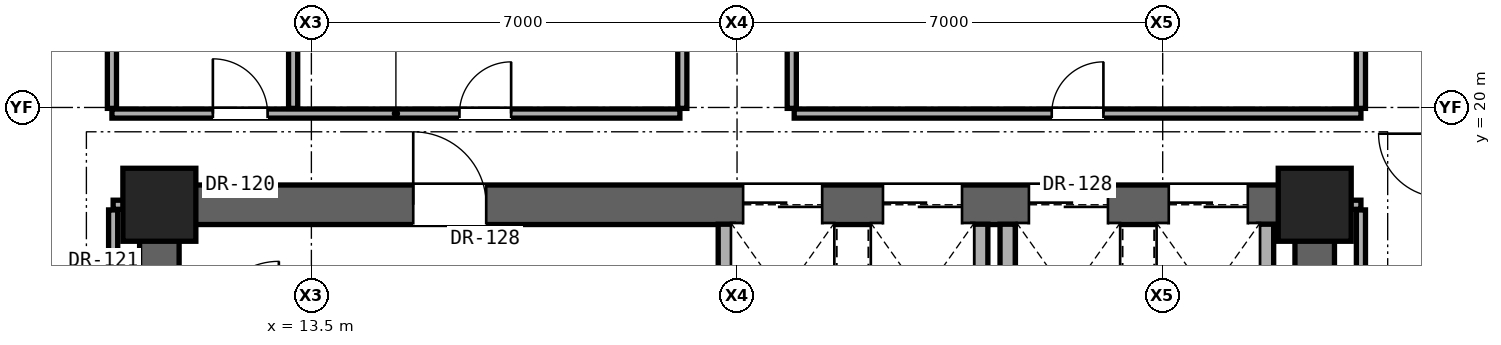
"""IFC4 building model, lengths in metres.
Left out: names, types, materials, properties, quantities, classifications, styles, units other than length and angle.
Written with IfcOpenShell. Run it as: python <this file> out.ifc"""

import sys

from ifc_helpers import new_model, si_unit, direction, frame, frame_2d, origin, origin_2d, place, context, subcontext, project, spatial, rectangle, extrude, element, fill, save


model = new_model("IFC4")
c1 = context("Model", 3, precision=1e-05, world=origin(), true_north=direction((0.0, 1.0)))
c2 = subcontext(c1, "Body", "Model", "MODEL_VIEW")
j1 = project(units=[si_unit("LENGTHUNIT", "METRE"), si_unit("PLANEANGLEUNIT", "RADIAN")], contexts=[c1])
p1 = place(None, origin())
s1 = spatial("IfcSite", under=j1, at=p1, CompositionType="ELEMENT")
p2 = place(p1, origin())
s2 = spatial("IfcBuilding", under=s1, at=p2, CompositionType="ELEMENT")
p3 = place(p2, frame((0.0, 0.0, 114.8)))
s3 = spatial("IfcBuildingStorey", under=s2, at=p3, CompositionType="ELEMENT", Elevation=114.8)
for number, where, z_axis, x_axis in (
    (1, (11.0, 18.4, 0.0), (0.0, 0.0, 1.0), (1.0, 0.0, 0.0)),
    (2, (30.0, 18.4, 0.0), (0.0, 0.0, 1.0), (1.0, 0.0, 0.0)),
):
    element("IfcColumn", number, at=place(p3, frame(where, z_axis=z_axis, x_axis=x_axis)), inside=s3, PredefinedType="COLUMN", context=c2, shape_type="SweptSolid", body=[
        extrude(rectangle(XDim=1.2, YDim=1.2, at=origin_2d()), origin(), (0.0, 0.0, 1.0), 3.3),
    ])
for number, where, z_axis, x_axis in (
    (3, (11.0, 12.4, 0.0), (0.0, 0.0, 1.0), (0.0, 1.0, 0.0)),
    (4, (30.0, 12.4, 0.0), (0.0, 0.0, 1.0), (0.0, 1.0, 0.0)),
):
    element("IfcWall", number, at=place(p3, frame(where, z_axis=z_axis, x_axis=x_axis)), inside=s3, PredefinedType="SHEAR", context=c2, shape_type="SweptSolid", body=[
        extrude(rectangle(XDim=6.0, YDim=0.65, at=frame_2d((3.0, 0.0))), origin(), (0.0, 0.0, 1.0), 3.08),
    ])
p4 = place(p3, frame((11.0, 18.4, 0.0), z_axis=(0.0, 0.0, 1.0), x_axis=(1.0, 0.0, 0.0)))
e5 = element("IfcWall", 5, at=p4, inside=s3, PredefinedType="SHEAR", context=c2, shape_type="SweptSolid", body=[
    extrude(rectangle(XDim=19.0, YDim=0.65, at=frame_2d((9.5, 0.0))), origin(), (0.0, 0.0, 1.0), 3.08),
])
p5 = place(p4, frame((4.175, 0.0, 0.0)))
e6 = element("IfcOpeningElement", 6, at=p5, cuts=e5, PredefinedType="OPENING", context=c2, shape_type="SweptSolid", body=[
    extrude(rectangle(XDim=1.2, YDim=2.25, at=frame_2d((0.6, 1.125))), frame((0.0, 0.335, 0.0), z_axis=(0.0, -1.0, 0.0), x_axis=(1.0, 0.0, 0.0)), (0.0, 0.0, 1.0), 0.67),
])
p6 = place(p4, frame((9.6, 0.0, 0.0)))
e7 = element("IfcOpeningElement", 7, at=p6, cuts=e5, PredefinedType="OPENING", context=c2, shape_type="SweptSolid", body=[
    extrude(rectangle(XDim=1.3, YDim=2.3, at=frame_2d((0.65, 1.15))), frame((0.0, 0.335, 0.0), z_axis=(0.0, -1.0, 0.0), x_axis=(1.0, 0.0, 0.0)), (0.0, 0.0, 1.0), 0.67),
])
p7 = place(p4, frame((11.9, 0.0, 0.0)))
e8 = element("IfcOpeningElement", 8, at=p7, cuts=e5, PredefinedType="OPENING", context=c2, shape_type="SweptSolid", body=[
    extrude(rectangle(XDim=1.3, YDim=2.3, at=frame_2d((0.65, 1.15))), frame((0.0, 0.335, 0.0), z_axis=(0.0, -1.0, 0.0), x_axis=(1.0, 0.0, 0.0)), (0.0, 0.0, 1.0), 0.67),
])
p8 = place(p4, frame((14.3, 0.0, 0.0)))
e9 = element("IfcOpeningElement", 9, at=p8, cuts=e5, PredefinedType="OPENING", context=c2, shape_type="SweptSolid", body=[
    extrude(rectangle(XDim=1.3, YDim=2.3, at=frame_2d((0.65, 1.15))), frame((0.0, 0.335, 0.0), z_axis=(0.0, -1.0, 0.0), x_axis=(1.0, 0.0, 0.0)), (0.0, 0.0, 1.0), 0.67),
])
p9 = place(p4, frame((16.6, 0.0, 0.0)))
e10 = element("IfcOpeningElement", 10, at=p9, cuts=e5, PredefinedType="OPENING", context=c2, shape_type="SweptSolid", body=[
    extrude(rectangle(XDim=1.3, YDim=2.3, at=frame_2d((0.65, 1.15))), frame((0.0, 0.335, 0.0), z_axis=(0.0, -1.0, 0.0), x_axis=(1.0, 0.0, 0.0)), (0.0, 0.0, 1.0), 0.67),
])
for number, where, z_axis, x_axis in (
    (11, (10.24, 18.4, 0.0), (0.0, 0.0, 1.0), (1.0, 0.0, 0.0)),
    (12, (30.32, 18.4, 0.0), (0.0, 0.0, 1.0), (1.0, 0.0, 0.0)),
):
    element("IfcWall", number, at=place(p3, frame(where, z_axis=z_axis, x_axis=x_axis)), inside=s3, PredefinedType="PARTITIONING", context=c2, shape_type="SweptSolid", body=[
        extrude(rectangle(XDim=0.44, YDim=0.15, at=frame_2d((0.22, 0.0))), origin(), (0.0, 0.0, 1.0), 2.456),
    ])
p10 = place(p3, frame((10.22, 19.9, 0.0), z_axis=(0.0, 0.0, 1.0), x_axis=(1.0, 0.0, 0.0)))
e13 = element("IfcWall", 13, at=p10, inside=s3, PredefinedType="PARTITIONING", context=c2, shape_type="SweptSolid", body=[
    extrude(rectangle(XDim=9.34, YDim=0.15, at=frame_2d((4.67, 0.0))), origin(), (0.0, 0.0, 1.0), 2.124),
])
p11 = place(p10, frame((1.66, 0.0, 0.0)))
e14 = element("IfcOpeningElement", 14, at=p11, cuts=e13, PredefinedType="OPENING", context=c2, shape_type="SweptSolid", body=[
    extrude(rectangle(XDim=0.9, YDim=2.1, at=frame_2d((0.45, 1.05))), frame((0.0, 0.085, 0.0), z_axis=(0.0, -1.0, 0.0), x_axis=(1.0, 0.0, 0.0)), (0.0, 0.0, 1.0), 0.17),
])
p12 = place(p10, frame((5.715, 0.0, 0.0)))
e15 = element("IfcOpeningElement", 15, at=p12, cuts=e13, PredefinedType="OPENING", context=c2, shape_type="SweptSolid", body=[
    extrude(rectangle(XDim=0.85, YDim=2.01, at=frame_2d((0.425, 1.005))), frame((0.0, 0.085, 0.0), z_axis=(0.0, -1.0, 0.0), x_axis=(1.0, 0.0, 0.0)), (0.0, 0.0, 1.0), 0.17),
])
p13 = place(p3, frame((21.44, 19.9, 0.0), z_axis=(0.0, 0.0, 1.0), x_axis=(1.0, 0.0, 0.0)))
e16 = element("IfcWall", 16, at=p13, inside=s3, PredefinedType="PARTITIONING", context=c2, shape_type="SweptSolid", body=[
    extrude(rectangle(XDim=9.32, YDim=0.15, at=frame_2d((4.66, 0.0))), origin(), (0.0, 0.0, 1.0), 2.124),
])
p14 = place(p13, frame((4.235, 0.0, 0.0)))
e17 = element("IfcOpeningElement", 17, at=p14, cuts=e16, PredefinedType="OPENING", context=c2, shape_type="SweptSolid", body=[
    extrude(rectangle(XDim=0.85, YDim=2.01, at=frame_2d((0.425, 1.005))), frame((0.0, 0.085, 0.0), z_axis=(0.0, -1.0, 0.0), x_axis=(1.0, 0.0, 0.0)), (0.0, 0.0, 1.0), 0.17),
])
p15 = place(p3, frame((10.22, 19.985, 0.0), z_axis=(0.0, 0.0, 1.0), x_axis=(0.0, 1.0, 0.0)))
e18 = element("IfcWall", 18, at=p15, inside=s3, PredefinedType="PARTITIONING", context=c2, shape_type="SweptSolid", body=[
    extrude(rectangle(XDim=2.78, YDim=0.15, at=frame_2d((1.39, 0.0))), origin(), (0.0, 0.0, 1.0), 3.08),
])
p16 = place(p3, frame((10.24, 12.335, 0.0), z_axis=(0.0, 0.0, 1.0), x_axis=(0.0, 1.0, 0.0)))
e19 = element("IfcWall", 19, at=p16, inside=s3, PredefinedType="PARTITIONING", context=c2, shape_type="SweptSolid", body=[
    extrude(rectangle(XDim=5.98, YDim=0.15, at=frame_2d((2.99, 0.0))), origin(), (0.0, 0.0, 1.0), 2.456),
])
p17 = place(p3, frame((13.2, 19.985, 0.0), z_axis=(0.0, 0.0, 1.0), x_axis=(0.0, 1.0, 0.0)))
e20 = element("IfcWall", 20, at=p17, inside=s3, PredefinedType="PARTITIONING", context=c2, shape_type="SweptSolid", body=[
    extrude(rectangle(XDim=2.78, YDim=0.15, at=frame_2d((1.39, 0.0))), origin(), (0.0, 0.0, 1.0), 3.08),
])
p18 = place(p3, frame((19.6, 19.985, 0.0), z_axis=(0.0, 0.0, 1.0), x_axis=(0.0, 1.0, 0.0)))
e21 = element("IfcWall", 21, at=p18, inside=s3, PredefinedType="PARTITIONING", context=c2, shape_type="SweptSolid", body=[
    extrude(rectangle(XDim=5.53, YDim=0.15, at=frame_2d((2.765, 0.0))), origin(), (0.0, 0.0, 1.0), 2.124),
])
p19 = place(p3, frame((20.315, 16.555, 0.0), z_axis=(0.0, 0.0, 1.0), x_axis=(0.0, 1.0, 0.0)))
e22 = element("IfcWall", 22, at=p19, inside=s3, PredefinedType="SOLIDWALL", context=c2, shape_type="SweptSolid", body=[
    extrude(rectangle(XDim=1.525, YDim=0.25, at=frame_2d((0.763, 0.0))), origin(), (0.0, 0.0, 1.0), 3.08),
])
p20 = place(p3, frame((21.4, 19.985, 0.0), z_axis=(0.0, 0.0, 1.0), x_axis=(0.0, 1.0, 0.0)))
e23 = element("IfcWall", 23, at=p20, inside=s3, PredefinedType="PARTITIONING", context=c2, shape_type="SweptSolid", body=[
    extrude(rectangle(XDim=5.53, YDim=0.15, at=frame_2d((2.765, 0.0))), origin(), (0.0, 0.0, 1.0), 2.124),
])
for number, where, z_axis, x_axis in (
    (24, (24.5, 15.785, 0.0), (0.0, 0.0, 1.0), (0.0, 1.0, 0.0)),
    (25, (24.95, 15.785, 0.0), (0.0, 0.0, 1.0), (0.0, 1.0, 0.0)),
    (26, (29.2, 15.785, 0.0), (0.0, 0.0, 1.0), (0.0, 1.0, 0.0)),
):
    element("IfcWall", number, at=place(p3, frame(where, z_axis=z_axis, x_axis=x_axis)), inside=s3, PredefinedType="SOLIDWALL", context=c2, shape_type="SweptSolid", body=[
        extrude(rectangle(XDim=2.295, YDim=0.25, at=frame_2d((1.147, 0.0))), origin(), (0.0, 0.0, 1.0), 3.08),
    ])
p21 = place(p3, frame((30.76, 12.335, 0.0), z_axis=(0.0, 0.0, 1.0), x_axis=(0.0, 1.0, 0.0)))
e27 = element("IfcWall", 27, at=p21, inside=s3, PredefinedType="PARTITIONING", context=c2, shape_type="SweptSolid", body=[
    extrude(rectangle(XDim=5.98, YDim=0.15, at=frame_2d((2.99, 0.0))), origin(), (0.0, 0.0, 1.0), 2.456),
])
p22 = place(p3, frame((30.76, 19.985, 0.0), z_axis=(0.0, 0.0, 1.0), x_axis=(0.0, 1.0, 0.0)))
e28 = element("IfcWall", 28, at=p22, inside=s3, PredefinedType="PARTITIONING", context=c2, shape_type="SweptSolid", body=[
    extrude(rectangle(XDim=5.53, YDim=0.15, at=frame_2d((2.765, 0.0))), origin(), (0.0, 0.0, 1.0), 2.299),
])
p23 = place(p5, origin())
e29 = element("IfcDoor", 29, at=p23, inside=s3, OperationType="SINGLE_SWING_LEFT", PredefinedType="DOOR", context=c2, shape_type="SweptSolid", body=[
    extrude(rectangle(XDim=1.2, YDim=2.25, at=frame_2d((0.6, 1.125))), frame((0.0, 0.025, 0.0), z_axis=(0.0, -1.0, 0.0), x_axis=(1.0, 0.0, 0.0)), (0.0, 0.0, 1.0), 0.05),
])
fill(e6, e29)
p24 = place(p11, origin())
e30 = element("IfcDoor", 30, at=p24, inside=s3, OperationType="SINGLE_SWING_LEFT", PredefinedType="DOOR", context=c2, shape_type="SweptSolid", body=[
    extrude(rectangle(XDim=0.9, YDim=2.1, at=frame_2d((0.45, 1.05))), frame((0.0, 0.025, 0.0), z_axis=(0.0, -1.0, 0.0), x_axis=(1.0, 0.0, 0.0)), (0.0, 0.0, 1.0), 0.05),
])
fill(e14, e30)
p25 = place(p12, origin())
e31 = element("IfcDoor", 31, at=p25, inside=s3, OperationType="SINGLE_SWING_RIGHT", PredefinedType="DOOR", context=c2, shape_type="SweptSolid", body=[
    extrude(rectangle(XDim=0.85, YDim=2.01, at=frame_2d((0.425, 1.005))), frame((0.0, 0.025, 0.0), z_axis=(0.0, -1.0, 0.0), x_axis=(1.0, 0.0, 0.0)), (0.0, 0.0, 1.0), 0.05),
])
fill(e15, e31)
p26 = place(p14, origin())
e32 = element("IfcDoor", 32, at=p26, inside=s3, OperationType="SINGLE_SWING_RIGHT", PredefinedType="DOOR", context=c2, shape_type="SweptSolid", body=[
    extrude(rectangle(XDim=0.85, YDim=2.01, at=frame_2d((0.425, 1.005))), frame((0.0, 0.025, 0.0), z_axis=(0.0, -1.0, 0.0), x_axis=(1.0, 0.0, 0.0)), (0.0, 0.0, 1.0), 0.05),
])
fill(e17, e32)
p27 = place(p6, origin())
e33 = element("IfcDoor", 33, at=p27, inside=s3, OperationType="DOUBLE_DOOR_SLIDING", PredefinedType="DOOR", context=c2, shape_type="SweptSolid", body=[
    extrude(rectangle(XDim=1.3, YDim=2.3, at=frame_2d((0.65, 1.15))), frame((0.0, 0.025, 0.0), z_axis=(0.0, -1.0, 0.0), x_axis=(1.0, 0.0, 0.0)), (0.0, 0.0, 1.0), 0.05),
])
fill(e7, e33)
p28 = place(p7, origin())
e34 = element("IfcDoor", 34, at=p28, inside=s3, OperationType="DOUBLE_DOOR_SLIDING", PredefinedType="DOOR", context=c2, shape_type="SweptSolid", body=[
    extrude(rectangle(XDim=1.3, YDim=2.3, at=frame_2d((0.65, 1.15))), frame((0.0, 0.025, 0.0), z_axis=(0.0, -1.0, 0.0), x_axis=(1.0, 0.0, 0.0)), (0.0, 0.0, 1.0), 0.05),
])
fill(e8, e34)
p29 = place(p8, origin())
e35 = element("IfcDoor", 35, at=p29, inside=s3, OperationType="DOUBLE_DOOR_SLIDING", PredefinedType="DOOR", context=c2, shape_type="SweptSolid", body=[
    extrude(rectangle(XDim=1.3, YDim=2.3, at=frame_2d((0.65, 1.15))), frame((0.0, 0.025, 0.0), z_axis=(0.0, -1.0, 0.0), x_axis=(1.0, 0.0, 0.0)), (0.0, 0.0, 1.0), 0.05),
])
fill(e9, e35)
p30 = place(p9, origin())
e36 = element("IfcDoor", 36, at=p30, inside=s3, OperationType="DOUBLE_DOOR_SLIDING", PredefinedType="DOOR", context=c2, shape_type="SweptSolid", body=[
    extrude(rectangle(XDim=1.3, YDim=2.3, at=frame_2d((0.65, 1.15))), frame((0.0, 0.025, 0.0), z_axis=(0.0, -1.0, 0.0), x_axis=(1.0, 0.0, 0.0)), (0.0, 0.0, 1.0), 0.05),
])
fill(e10, e36)
save(model, sys.argv[1])
